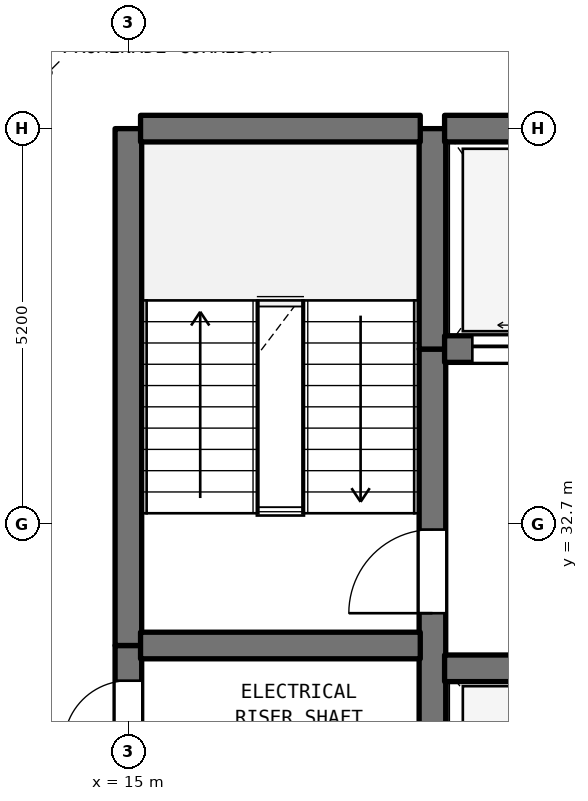
"""IFC4 building model, lengths in metres.
Left out: names, types, materials, properties, quantities, classifications, styles, units other than length and angle.
Written with IfcOpenShell. Run it as: python <this file> out.ifc"""

import sys

from ifc_helpers import new_model, si_unit, direction, frame, frame_2d, origin, place, context, subcontext, project, spatial, rectangle, extrude, element, fill, save


model = new_model("IFC4")
c1 = context("Model", 3, precision=1e-05, world=origin(), true_north=direction((0.0, 1.0)))
c2 = subcontext(c1, "Body", "Model", "MODEL_VIEW")
j1 = project(units=[si_unit("LENGTHUNIT", "METRE"), si_unit("PLANEANGLEUNIT", "RADIAN")], contexts=[c1])
p1 = place(None, origin())
s1 = spatial("IfcSite", under=j1, at=p1, CompositionType="ELEMENT")
p2 = place(p1, origin())
s2 = spatial("IfcBuilding", under=s1, at=p2, CompositionType="ELEMENT")
p3 = place(p2, frame((0.0, 0.0, 172.8)))
s3 = spatial("IfcBuildingStorey", under=s2, at=p3, CompositionType="ELEMENT", Elevation=172.8)
p4 = place(p3, frame((15.0, 29.5, 0.0), z_axis=(0.0, 0.0, 1.0), x_axis=(0.0, 1.0, 0.0)))
e1 = element("IfcWall", 1, at=p4, inside=s3, PredefinedType="SHEAR", context=c2, shape_type="SweptSolid", body=[
    extrude(rectangle(XDim=1.6, YDim=0.35, at=frame_2d((0.8, 0.0))), origin(), (0.0, 0.0, 1.0), 3.39),
])
p5 = place(p4, frame((0.287, 0.0, 0.0)))
e2 = element("IfcOpeningElement", 2, at=p5, cuts=e1, PredefinedType="OPENING", context=c2, shape_type="SweptSolid", body=[
    extrude(rectangle(XDim=0.85, YDim=2.1, at=frame_2d((0.425, 1.05))), frame((0.0, 0.185, 0.0), z_axis=(0.0, -1.0, 0.0), x_axis=(1.0, 0.0, 0.0)), (0.0, 0.0, 1.0), 0.37),
])
p6 = place(p3, frame((15.0, 31.1, 0.0), z_axis=(0.0, 0.0, 1.0), x_axis=(0.0, 1.0, 0.0)))
e3 = element("IfcWall", 3, at=p6, inside=s3, PredefinedType="SHEAR", context=c2, shape_type="SweptSolid", body=[
    extrude(rectangle(XDim=6.8, YDim=0.35, at=frame_2d((3.4, 0.0))), origin(), (0.0, 0.0, 1.0), 3.39),
])
p7 = place(p3, frame((19.0, 29.5, 0.0), z_axis=(0.0, 0.0, 1.0), x_axis=(0.0, 1.0, 0.0)))
e4 = element("IfcWall", 4, at=p7, inside=s3, PredefinedType="SHEAR", context=c2, shape_type="SweptSolid", body=[
    extrude(rectangle(XDim=5.5, YDim=0.35, at=frame_2d((2.75, 0.0))), origin(), (0.0, 0.0, 1.0), 3.39),
])
p8 = place(p7, frame((2.025, 0.0, 0.0)))
e5 = element("IfcOpeningElement", 5, at=p8, cuts=e4, PredefinedType="OPENING", context=c2, shape_type="SweptSolid", body=[
    extrude(rectangle(XDim=1.1, YDim=2.15, at=frame_2d((0.55, 1.075))), frame((0.0, 0.185, 0.0), z_axis=(0.0, -1.0, 0.0), x_axis=(1.0, 0.0, 0.0)), (0.0, 0.0, 1.0), 0.37),
])
p9 = place(p3, frame((19.0, 35.0, 0.0), z_axis=(0.0, 0.0, 1.0), x_axis=(0.0, 1.0, 0.0)))
e6 = element("IfcWall", 6, at=p9, inside=s3, PredefinedType="SHEAR", context=c2, shape_type="SweptSolid", body=[
    extrude(rectangle(XDim=2.9, YDim=0.35, at=frame_2d((1.45, 0.0))), origin(), (0.0, 0.0, 1.0), 3.39),
])
p10 = place(p3, frame((19.16, 30.8, 0.0), z_axis=(0.0, 0.0, 1.0), x_axis=(1.0, 0.0, 0.0)))
e7 = element("IfcWall", 7, at=p10, inside=s3, PredefinedType="SHEAR", context=c2, shape_type="SweptSolid", body=[
    extrude(rectangle(XDim=4.48, YDim=0.35, at=frame_2d((2.24, 0.0))), origin(), (0.0, 0.0, 1.0), 3.39),
])
p11 = place(p3, frame((15.16, 31.1, 0.0), z_axis=(0.0, 0.0, 1.0), x_axis=(1.0, 0.0, 0.0)))
e8 = element("IfcWall", 8, at=p11, inside=s3, PredefinedType="SHEAR", context=c2, shape_type="SweptSolid", body=[
    extrude(rectangle(XDim=3.68, YDim=0.35, at=frame_2d((1.84, 0.0))), origin(), (0.0, 0.0, 1.0), 3.39),
])
p12 = place(p3, frame((19.16, 35.0, 0.0), z_axis=(0.0, 0.0, 1.0), x_axis=(1.0, 0.0, 0.0)))
e9 = element("IfcWall", 9, at=p12, inside=s3, PredefinedType="SHEAR", context=c2, shape_type="SweptSolid", body=[
    extrude(rectangle(XDim=4.48, YDim=0.35, at=frame_2d((2.24, 0.0))), origin(), (0.0, 0.0, 1.0), 3.39),
])
p13 = place(p12, frame((0.365, 0.0, 0.0)))
e10 = element("IfcOpeningElement", 10, at=p13, cuts=e9, PredefinedType="OPENING", context=c2, shape_type="SweptSolid", body=[
    extrude(rectangle(XDim=1.35, YDim=2.2, at=frame_2d((0.675, 1.1))), frame((0.0, 0.185, 0.0), z_axis=(0.0, -1.0, 0.0), x_axis=(1.0, 0.0, 0.0)), (0.0, 0.0, 1.0), 0.37),
])
p14 = place(p12, frame((2.765, 0.0, 0.0)))
e11 = element("IfcOpeningElement", 11, at=p14, cuts=e9, PredefinedType="OPENING", context=c2, shape_type="SweptSolid", body=[
    extrude(rectangle(XDim=1.35, YDim=2.2, at=frame_2d((0.675, 1.1))), frame((0.0, 0.185, 0.0), z_axis=(0.0, -1.0, 0.0), x_axis=(1.0, 0.0, 0.0)), (0.0, 0.0, 1.0), 0.37),
])
p15 = place(p3, frame((15.16, 37.9, 0.0), z_axis=(0.0, 0.0, 1.0), x_axis=(1.0, 0.0, 0.0)))
e12 = element("IfcWall", 12, at=p15, inside=s3, PredefinedType="SHEAR", context=c2, shape_type="SweptSolid", body=[
    extrude(rectangle(XDim=3.68, YDim=0.35, at=frame_2d((1.84, 0.0))), origin(), (0.0, 0.0, 1.0), 3.39),
])
p16 = place(p3, frame((19.16, 37.9, 0.0), z_axis=(0.0, 0.0, 1.0), x_axis=(1.0, 0.0, 0.0)))
e13 = element("IfcWall", 13, at=p16, inside=s3, PredefinedType="SHEAR", context=c2, shape_type="SweptSolid", body=[
    extrude(rectangle(XDim=4.48, YDim=0.35, at=frame_2d((2.24, 0.0))), origin(), (0.0, 0.0, 1.0), 3.39),
])
p17 = place(p5, origin())
e14 = element("IfcDoor", 14, at=p17, inside=s3, OperationType="SINGLE_SWING_LEFT", PredefinedType="DOOR", context=c2, shape_type="SweptSolid", body=[
    extrude(rectangle(XDim=0.85, YDim=2.1, at=frame_2d((0.425, 1.05))), frame((0.0, 0.025, 0.0), z_axis=(0.0, -1.0, 0.0), x_axis=(1.0, 0.0, 0.0)), (0.0, 0.0, 1.0), 0.05),
])
fill(e2, e14)
p18 = place(p8, origin())
e15 = element("IfcDoor", 15, at=p18, inside=s3, OperationType="SINGLE_SWING_LEFT", PredefinedType="DOOR", context=c2, shape_type="SweptSolid", body=[
    extrude(rectangle(XDim=1.1, YDim=2.15, at=frame_2d((0.55, 1.075))), frame((0.0, 0.025, 0.0), z_axis=(0.0, -1.0, 0.0), x_axis=(1.0, 0.0, 0.0)), (0.0, 0.0, 1.0), 0.05),
])
fill(e5, e15)
p19 = place(p13, origin())
e16 = element("IfcDoor", 16, at=p19, inside=s3, OperationType="DOUBLE_DOOR_SLIDING", PredefinedType="DOOR", context=c2, shape_type="SweptSolid", body=[
    extrude(rectangle(XDim=1.35, YDim=2.2, at=frame_2d((0.675, 1.1))), frame((0.0, 0.025, 0.0), z_axis=(0.0, -1.0, 0.0), x_axis=(1.0, 0.0, 0.0)), (0.0, 0.0, 1.0), 0.05),
])
fill(e10, e16)
save(model, sys.argv[1])
